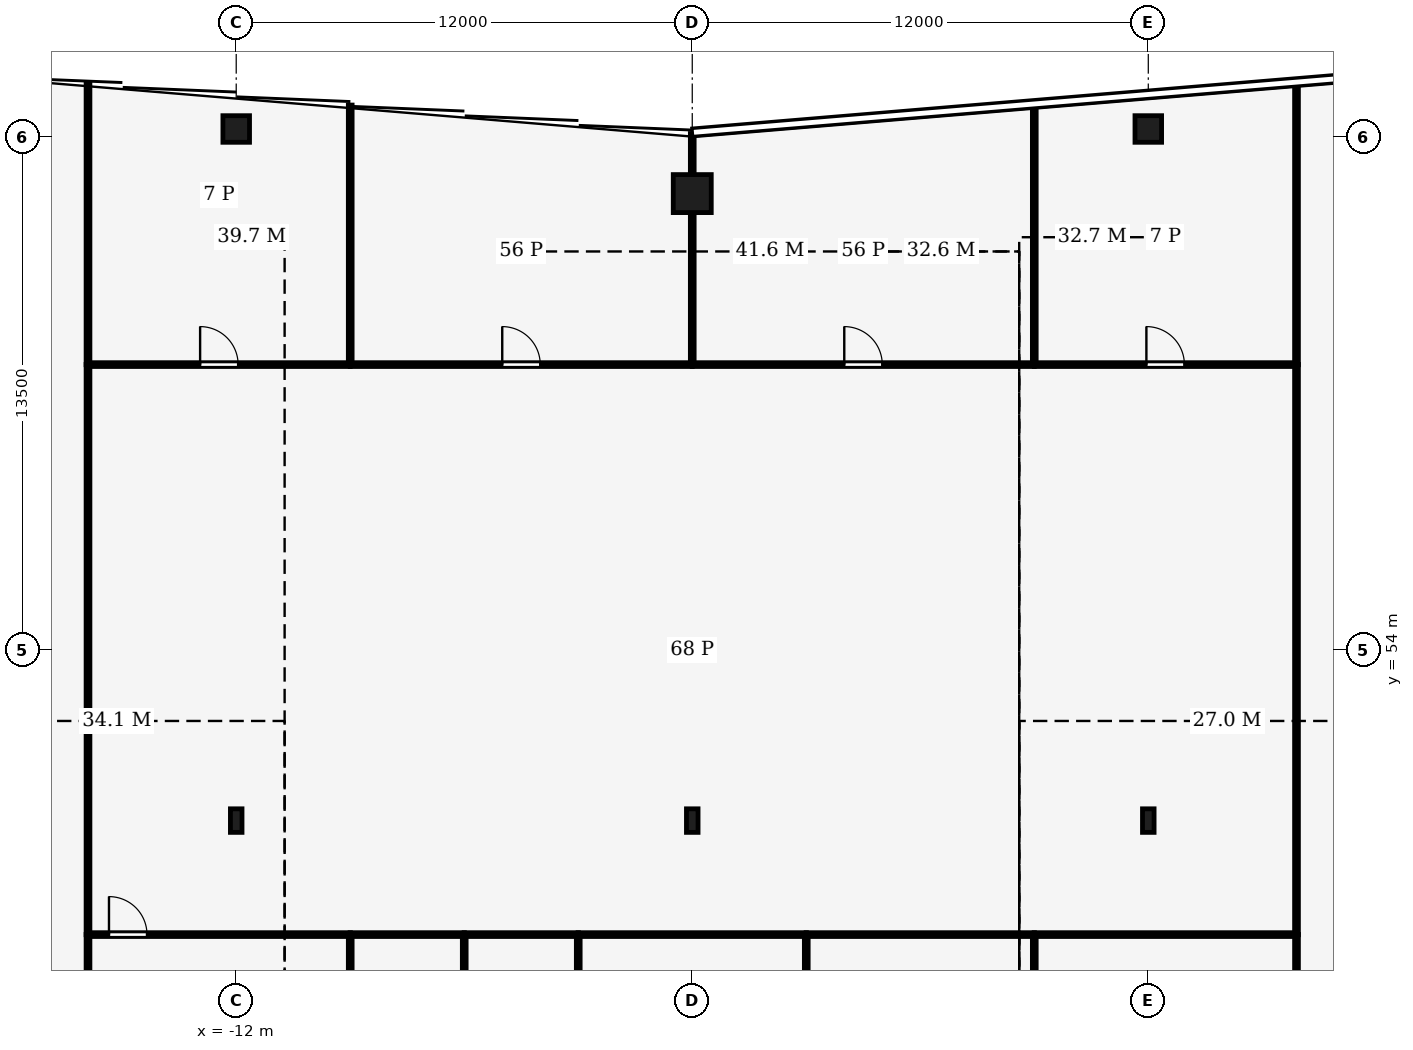
"""IFC4 building model, lengths in metres.
Left out: names, types, materials, properties, quantities, classifications, styles, units other than length and angle.
Written with IfcOpenShell. Run it as: python <this file> out.ifc"""

import sys

from ifc_helpers import new_model, si_unit, direction, frame, frame_2d, origin, origin_2d, place, context, subcontext, project, spatial, rectangle, hollow_rectangle, i_section, extrude, element, fill, save


model = new_model("IFC4")
c1 = context("Model", 3, precision=1e-05, world=origin(), true_north=direction((0.0, 1.0)))
c2 = subcontext(c1, "Body", "Model", "MODEL_VIEW")
j1 = project(units=[si_unit("LENGTHUNIT", "METRE"), si_unit("PLANEANGLEUNIT", "RADIAN")], contexts=[c1])
p1 = place(None, origin())
s1 = spatial("IfcSite", under=j1, at=p1, CompositionType="ELEMENT")
p2 = place(p1, origin())
s2 = spatial("IfcBuilding", under=s1, at=p2, CompositionType="ELEMENT")
p3 = place(p2, frame((0.0, 0.0, 202.0)))
s3 = spatial("IfcBuildingStorey", under=s2, at=p3, CompositionType="ELEMENT", Elevation=202.0)
p4 = place(p3, frame((0.0, 66.0, 0.0), z_axis=(0.0, 0.0, 1.0), x_axis=(1.0, 0.0, 0.0)))
e1 = element("IfcColumn", 1, at=p4, inside=s3, PredefinedType="COLUMN", context=c2, shape_type="SweptSolid", body=[
    extrude(hollow_rectangle(XDim=1.0, YDim=1.0, WallThickness=0.06, at=origin_2d()), origin(), (0.0, 0.0, 1.0), 4.0),
])
for number, where, z_axis, x_axis in (
    (2, (-12.0, 67.7, 0.0), (0.0, 0.0, 1.0), (1.0, 0.0, 0.0)),
    (3, (12.0, 67.7, 0.0), (0.0, 0.0, 1.0), (1.0, 0.0, 0.0)),
):
    element("IfcColumn", number, at=place(p3, frame(where, z_axis=z_axis, x_axis=x_axis)), inside=s3, PredefinedType="COLUMN", context=c2, shape_type="SweptSolid", body=[
        extrude(hollow_rectangle(XDim=0.7, YDim=0.7, WallThickness=0.03, at=origin_2d()), origin(), (0.0, 0.0, 1.0), 4.0),
    ])
for number, where, z_axis, x_axis in (
    (4, (-12.0, 49.5, 0.0), (0.0, 0.0, 1.0), (1.0, 0.0, 0.0)),
    (5, (0.0, 49.5, 0.0), (0.0, 0.0, 1.0), (1.0, 0.0, 0.0)),
    (6, (12.0, 49.5, 0.0), (0.0, 0.0, 1.0), (1.0, 0.0, 0.0)),
):
    element("IfcColumn", number, at=place(p3, frame(where, z_axis=z_axis, x_axis=x_axis)), inside=s3, PredefinedType="COLUMN", context=c2, shape_type="SweptSolid", body=[
        extrude(i_section(OverallWidth=0.305, OverallDepth=0.62, WebThickness=0.021, FlangeThickness=0.04, FilletRadius=0.027, at=origin_2d()), origin(), (0.0, 0.0, 1.0), 4.0),
    ])
p5 = place(p3, frame((-9.0, 46.5, 0.0), z_axis=(0.0, 0.0, 1.0), x_axis=(0.0, -1.0, 0.0)))
e7 = element("IfcWall", 7, at=p5, inside=s3, PredefinedType="PARTITIONING", context=c2, shape_type="SweptSolid", body=[
    extrude(rectangle(XDim=5.6, YDim=0.1, at=frame_2d((2.8, 0.0))), origin(), (0.0, 0.0, 1.0), 3.87),
])
p6 = place(p5, frame((2.3, 0.0, 0.0)))
e8 = element("IfcOpeningElement", 8, at=p6, cuts=e7, PredefinedType="OPENING", context=c2, shape_type="SweptSolid", body=[
    extrude(rectangle(XDim=1.0, YDim=2.1, at=frame_2d((0.5, 1.05))), frame((0.0, 0.06, 0.0), z_axis=(0.0, -1.0, 0.0), x_axis=(1.0, 0.0, 0.0)), (0.0, 0.0, 1.0), 0.12),
])
p7 = place(p3, frame((-15.9, 46.5, 0.0), z_axis=(0.0, 0.0, 1.0), x_axis=(1.0, 0.0, 0.0)))
e9 = element("IfcWall", 9, at=p7, inside=s3, PredefinedType="PARTITIONING", context=c2, shape_type="SweptSolid", body=[
    extrude(rectangle(XDim=6.904, YDim=0.1, at=frame_2d((3.452, 0.0))), origin(), (0.0, 0.0, 1.0), 3.44),
])
p8 = place(p7, frame((0.552, 0.0, 0.0)))
e10 = element("IfcOpeningElement", 10, at=p8, cuts=e9, PredefinedType="OPENING", context=c2, shape_type="SweptSolid", body=[
    extrude(rectangle(XDim=1.0, YDim=2.1, at=frame_2d((0.5, 1.05))), frame((0.0, 0.06, 0.0), z_axis=(0.0, -1.0, 0.0), x_axis=(1.0, 0.0, 0.0)), (0.0, 0.0, 1.0), 0.12),
])
p9 = place(p3, frame((-15.9, 46.504, 0.0), z_axis=(0.0, 0.0, 1.0), x_axis=(0.0, -1.0, 0.0)))
e11 = element("IfcWall", 11, at=p9, inside=s3, PredefinedType="PARTITIONING", context=c2, shape_type="SweptSolid", body=[
    extrude(rectangle(XDim=5.608, YDim=0.1, at=frame_2d((2.804, 0.0))), origin(), (0.0, 0.0, 1.0), 3.44),
])
p10 = place(p3, frame((-6.0, 46.5, 0.0), z_axis=(0.0, 0.0, 1.0), x_axis=(0.0, -1.0, 0.0)))
e12 = element("IfcWall", 12, at=p10, inside=s3, PredefinedType="PARTITIONING", context=c2, shape_type="SweptSolid", body=[
    extrude(rectangle(XDim=5.6, YDim=0.1, at=frame_2d((2.8, 0.0))), origin(), (0.0, 0.0, 1.0), 3.87),
])
p11 = place(p10, frame((2.3, 0.0, 0.0)))
e13 = element("IfcOpeningElement", 13, at=p11, cuts=e12, PredefinedType="OPENING", context=c2, shape_type="SweptSolid", body=[
    extrude(rectangle(XDim=1.0, YDim=2.1, at=frame_2d((0.5, 1.05))), frame((0.0, 0.06, 0.0), z_axis=(0.0, -1.0, 0.0), x_axis=(1.0, 0.0, 0.0)), (0.0, 0.0, 1.0), 0.12),
])
p12 = place(p3, frame((-5.996, 46.5, 0.0), z_axis=(0.0, 0.0, 1.0), x_axis=(-1.0, 0.0, 0.0)))
e14 = element("IfcWall", 14, at=p12, inside=s3, PredefinedType="PARTITIONING", context=c2, shape_type="SweptSolid", body=[
    extrude(rectangle(XDim=3.008, YDim=0.1, at=frame_2d((1.504, 0.0))), origin(), (0.0, 0.0, 1.0), 3.44),
])
p13 = place(p3, frame((-3.0, 40.9, 0.0), z_axis=(0.0, 0.0, 1.0), x_axis=(0.0, 1.0, 0.0)))
e15 = element("IfcWall", 15, at=p13, inside=s3, PredefinedType="PARTITIONING", context=c2, shape_type="SweptSolid", body=[
    extrude(rectangle(XDim=5.6, YDim=0.1, at=frame_2d((2.8, 0.0))), origin(), (0.0, 0.0, 1.0), 3.87),
])
p14 = place(p3, frame((-2.996, 46.5, 0.0), z_axis=(0.0, 0.0, 1.0), x_axis=(-1.0, 0.0, 0.0)))
e16 = element("IfcWall", 16, at=p14, inside=s3, PredefinedType="PARTITIONING", context=c2, shape_type="SweptSolid", body=[
    extrude(rectangle(XDim=3.008, YDim=0.1, at=frame_2d((1.504, 0.0))), origin(), (0.0, 0.0, 1.0), 3.44),
])
p15 = place(p3, frame((3.0, 40.9, 0.0), z_axis=(0.0, 0.0, 1.0), x_axis=(0.0, 1.0, 0.0)))
e17 = element("IfcWall", 17, at=p15, inside=s3, PredefinedType="PARTITIONING", context=c2, shape_type="SweptSolid", body=[
    extrude(rectangle(XDim=5.6, YDim=0.1, at=frame_2d((2.8, 0.0))), origin(), (0.0, 0.0, 1.0), 3.87),
])
p16 = place(p3, frame((3.004, 46.5, 0.0), z_axis=(0.0, 0.0, 1.0), x_axis=(-1.0, 0.0, 0.0)))
e18 = element("IfcWall", 18, at=p16, inside=s3, PredefinedType="PARTITIONING", context=c2, shape_type="SweptSolid", body=[
    extrude(rectangle(XDim=6.008, YDim=0.1, at=frame_2d((3.004, 0.0))), origin(), (0.0, 0.0, 1.0), 3.44),
])
p17 = place(p3, frame((9.0, 40.9, 0.0), z_axis=(0.0, 0.0, 1.0), x_axis=(0.0, 1.0, 0.0)))
e19 = element("IfcWall", 19, at=p17, inside=s3, PredefinedType="PARTITIONING", context=c2, shape_type="SweptSolid", body=[
    extrude(rectangle(XDim=5.6, YDim=0.1, at=frame_2d((2.8, 0.0))), origin(), (0.0, 0.0, 1.0), 3.87),
])
p18 = place(p3, frame((9.004, 46.5, 0.0), z_axis=(0.0, 0.0, 1.0), x_axis=(-1.0, 0.0, 0.0)))
e20 = element("IfcWall", 20, at=p18, inside=s3, PredefinedType="PARTITIONING", context=c2, shape_type="SweptSolid", body=[
    extrude(rectangle(XDim=6.008, YDim=0.1, at=frame_2d((3.004, 0.0))), origin(), (0.0, 0.0, 1.0), 3.44),
])
p19 = place(p3, frame((15.9, 46.5, 0.0), z_axis=(0.0, 0.0, 1.0), x_axis=(-1.0, 0.0, 0.0)))
e21 = element("IfcWall", 21, at=p19, inside=s3, PredefinedType="PARTITIONING", context=c2, shape_type="SweptSolid", body=[
    extrude(rectangle(XDim=6.904, YDim=0.1, at=frame_2d((3.452, 0.0))), origin(), (0.0, 0.0, 1.0), 3.44),
])
p20 = place(p3, frame((15.9, 40.896, 0.0), z_axis=(0.0, 0.0, 1.0), x_axis=(0.0, 1.0, 0.0)))
e22 = element("IfcWall", 22, at=p20, inside=s3, PredefinedType="PARTITIONING", context=c2, shape_type="SweptSolid", body=[
    extrude(rectangle(XDim=5.608, YDim=0.1, at=frame_2d((2.804, 0.0))), origin(), (0.0, 0.0, 1.0), 3.44),
])
p21 = place(p3, frame((-15.9, 61.5, 0.0), z_axis=(0.0, 0.0, 1.0), x_axis=(1.0, 0.0, 0.0)))
e23 = element("IfcWall", 23, at=p21, inside=s3, PredefinedType="PARTITIONING", context=c2, shape_type="SweptSolid", body=[
    extrude(rectangle(XDim=6.9, YDim=0.1, at=frame_2d((3.45, 0.0))), origin(), (0.0, 0.0, 1.0), 3.24),
])
p22 = place(p21, frame((2.95, 0.0, 0.0)))
e24 = element("IfcOpeningElement", 24, at=p22, cuts=e23, PredefinedType="OPENING", context=c2, shape_type="SweptSolid", body=[
    extrude(rectangle(XDim=1.0, YDim=2.1, at=frame_2d((0.5, 1.05))), frame((0.0, 0.06, 0.0), z_axis=(0.0, -1.0, 0.0), x_axis=(1.0, 0.0, 0.0)), (0.0, 0.0, 1.0), 0.12),
])
p23 = place(p3, frame((-9.0, 61.5, 0.0), z_axis=(0.0, 0.0, 1.0), x_axis=(1.0, 0.0, 0.0)))
e25 = element("IfcWall", 25, at=p23, inside=s3, PredefinedType="PARTITIONING", context=c2, shape_type="SweptSolid", body=[
    extrude(rectangle(XDim=9.0, YDim=0.1, at=frame_2d((4.5, 0.0))), origin(), (0.0, 0.0, 1.0), 3.24),
])
p24 = place(p23, frame((4.0, 0.0, 0.0)))
e26 = element("IfcOpeningElement", 26, at=p24, cuts=e25, PredefinedType="OPENING", context=c2, shape_type="SweptSolid", body=[
    extrude(rectangle(XDim=1.0, YDim=2.1, at=frame_2d((0.5, 1.05))), frame((0.0, 0.06, 0.0), z_axis=(0.0, -1.0, 0.0), x_axis=(1.0, 0.0, 0.0)), (0.0, 0.0, 1.0), 0.12),
])
p25 = place(p3, frame((0.0, 61.5, 0.0), z_axis=(0.0, 0.0, 1.0), x_axis=(1.0, 0.0, 0.0)))
e27 = element("IfcWall", 27, at=p25, inside=s3, PredefinedType="PARTITIONING", context=c2, shape_type="SweptSolid", body=[
    extrude(rectangle(XDim=9.0, YDim=0.1, at=frame_2d((4.5, 0.0))), origin(), (0.0, 0.0, 1.0), 3.24),
])
p26 = place(p25, frame((4.0, 0.0, 0.0)))
e28 = element("IfcOpeningElement", 28, at=p26, cuts=e27, PredefinedType="OPENING", context=c2, shape_type="SweptSolid", body=[
    extrude(rectangle(XDim=1.0, YDim=2.1, at=frame_2d((0.5, 1.05))), frame((0.0, 0.06, 0.0), z_axis=(0.0, -1.0, 0.0), x_axis=(1.0, 0.0, 0.0)), (0.0, 0.0, 1.0), 0.12),
])
p27 = place(p3, frame((9.0, 61.5, 0.0), z_axis=(0.0, 0.0, 1.0), x_axis=(1.0, 0.0, 0.0)))
e29 = element("IfcWall", 29, at=p27, inside=s3, PredefinedType="PARTITIONING", context=c2, shape_type="SweptSolid", body=[
    extrude(rectangle(XDim=6.9, YDim=0.1, at=frame_2d((3.45, 0.0))), origin(), (0.0, 0.0, 1.0), 3.24),
])
p28 = place(p27, frame((2.95, 0.0, 0.0)))
e30 = element("IfcOpeningElement", 30, at=p28, cuts=e29, PredefinedType="OPENING", context=c2, shape_type="SweptSolid", body=[
    extrude(rectangle(XDim=1.0, YDim=2.1, at=frame_2d((0.5, 1.05))), frame((0.0, 0.06, 0.0), z_axis=(0.0, -1.0, 0.0), x_axis=(1.0, 0.0, 0.0)), (0.0, 0.0, 1.0), 0.12),
])
for number, where, z_axis, x_axis in (
    (31, (-15.9, 61.504, 0.0), (0.0, 0.0, 1.0), (0.0, -1.0, 0.0)),
    (32, (15.9, 46.496, 0.0), (0.0, 0.0, 1.0), (0.0, 1.0, 0.0)),
):
    element("IfcWall", number, at=place(p3, frame(where, z_axis=z_axis, x_axis=x_axis)), inside=s3, PredefinedType="PARTITIONING", context=c2, shape_type="SweptSolid", body=[
        extrude(rectangle(XDim=15.008, YDim=0.1, at=frame_2d((7.504, 0.0))), origin(), (0.0, 0.0, 1.0), 3.24),
    ])
p29 = place(p3, frame((-9.0, 61.5, 0.0), z_axis=(0.0, 0.0, 1.0), x_axis=(0.0, 1.0, 0.0)))
e33 = element("IfcWall", 33, at=p29, inside=s3, PredefinedType="PARTITIONING", context=c2, shape_type="SweptSolid", body=[
    extrude(rectangle(XDim=6.83, YDim=0.1, at=frame_2d((3.415, 0.0))), origin(), (0.0, 0.0, 1.0), 3.04),
])
p30 = place(p3, frame((-15.9, 68.905, 0.0), z_axis=(0.0, 0.0, 1.0), x_axis=(0.0, -1.0, 0.0)))
e34 = element("IfcWall", 34, at=p30, inside=s3, PredefinedType="PARTITIONING", context=c2, shape_type="SweptSolid", body=[
    extrude(rectangle(XDim=7.409, YDim=0.1, at=frame_2d((3.705, 0.0))), origin(), (0.0, 0.0, 1.0), 3.04),
])
p31 = place(p3, frame((0.0, 61.5, 0.0), z_axis=(0.0, 0.0, 1.0), x_axis=(0.0, 1.0, 0.0)))
e35 = element("IfcWall", 35, at=p31, inside=s3, PredefinedType="PARTITIONING", context=c2, shape_type="SweptSolid", body=[
    extrude(rectangle(XDim=6.08, YDim=0.1, at=frame_2d((3.04, 0.0))), origin(), (0.0, 0.0, 1.0), 3.04),
])
p32 = place(p3, frame((9.0, 61.5, 0.0), z_axis=(0.0, 0.0, 1.0), x_axis=(0.0, 1.0, 0.0)))
e36 = element("IfcWall", 36, at=p32, inside=s3, PredefinedType="PARTITIONING", context=c2, shape_type="SweptSolid", body=[
    extrude(rectangle(XDim=6.83, YDim=0.1, at=frame_2d((3.415, 0.0))), origin(), (0.0, 0.0, 1.0), 3.04),
])
p33 = place(p3, frame((15.9, 61.496, 0.0), z_axis=(0.0, 0.0, 1.0), x_axis=(0.0, 1.0, 0.0)))
e37 = element("IfcWall", 37, at=p33, inside=s3, PredefinedType="PARTITIONING", context=c2, shape_type="SweptSolid", body=[
    extrude(rectangle(XDim=7.409, YDim=0.1, at=frame_2d((3.705, 0.0))), origin(), (0.0, 0.0, 1.0), 3.04),
])
p34 = place(p8, origin())
e38 = element("IfcDoor", 38, at=p34, inside=s3, OperationType="SINGLE_SWING_LEFT", PredefinedType="DOOR", context=c2, shape_type="SweptSolid", body=[
    extrude(rectangle(XDim=1.0, YDim=2.1, at=frame_2d((0.5, 1.05))), frame((0.0, 0.025, 0.0), z_axis=(0.0, -1.0, 0.0), x_axis=(1.0, 0.0, 0.0)), (0.0, 0.0, 1.0), 0.05),
])
fill(e10, e38)
p35 = place(p22, origin())
e39 = element("IfcDoor", 39, at=p35, inside=s3, OperationType="SINGLE_SWING_LEFT", PredefinedType="DOOR", context=c2, shape_type="SweptSolid", body=[
    extrude(rectangle(XDim=1.0, YDim=2.1, at=frame_2d((0.5, 1.05))), frame((0.0, 0.025, 0.0), z_axis=(0.0, -1.0, 0.0), x_axis=(1.0, 0.0, 0.0)), (0.0, 0.0, 1.0), 0.05),
])
fill(e24, e39)
p36 = place(p24, origin())
e40 = element("IfcDoor", 40, at=p36, inside=s3, OperationType="SINGLE_SWING_RIGHT", PredefinedType="DOOR", context=c2, shape_type="SweptSolid", body=[
    extrude(rectangle(XDim=1.0, YDim=2.1, at=frame_2d((0.5, 1.05))), frame((0.0, 0.025, 0.0), z_axis=(0.0, -1.0, 0.0), x_axis=(1.0, 0.0, 0.0)), (0.0, 0.0, 1.0), 0.05),
])
fill(e26, e40)
p37 = place(p26, origin())
e41 = element("IfcDoor", 41, at=p37, inside=s3, OperationType="SINGLE_SWING_LEFT", PredefinedType="DOOR", context=c2, shape_type="SweptSolid", body=[
    extrude(rectangle(XDim=1.0, YDim=2.1, at=frame_2d((0.5, 1.05))), frame((0.0, 0.025, 0.0), z_axis=(0.0, -1.0, 0.0), x_axis=(1.0, 0.0, 0.0)), (0.0, 0.0, 1.0), 0.05),
])
fill(e28, e41)
p38 = place(p28, origin())
e42 = element("IfcDoor", 42, at=p38, inside=s3, OperationType="SINGLE_SWING_RIGHT", PredefinedType="DOOR", context=c2, shape_type="SweptSolid", body=[
    extrude(rectangle(XDim=1.0, YDim=2.1, at=frame_2d((0.5, 1.05))), frame((0.0, 0.025, 0.0), z_axis=(0.0, -1.0, 0.0), x_axis=(1.0, 0.0, 0.0)), (0.0, 0.0, 1.0), 0.05),
])
fill(e30, e42)
save(model, sys.argv[1])
